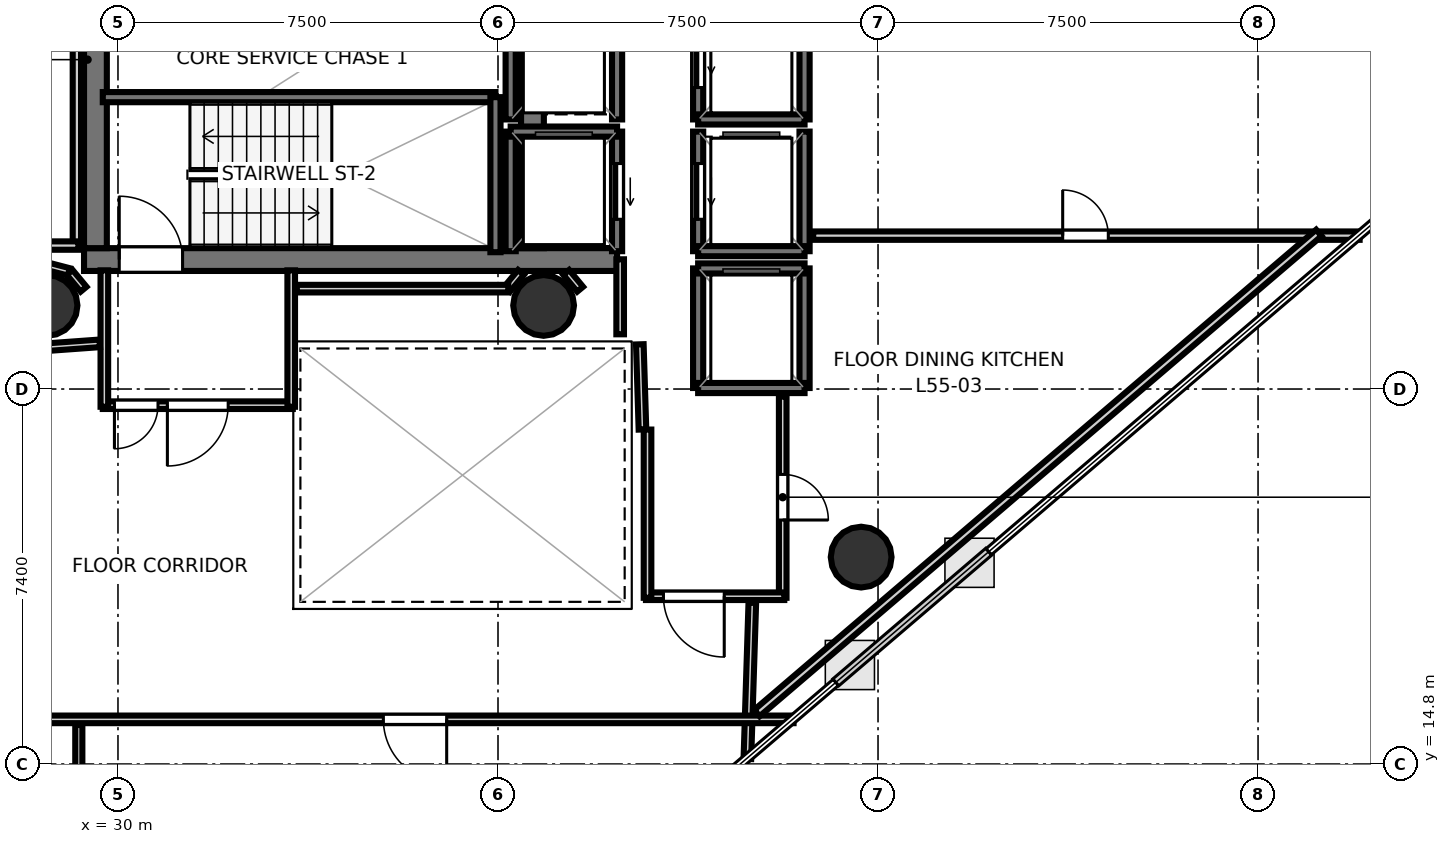
"""IFC4 building model, lengths in metres.
Left out: names, types, materials, properties, quantities, classifications, styles, units other than length and angle.
Written with IfcOpenShell. Run it as: python <this file> out.ifc"""

import sys

from ifc_helpers import new_model, si_unit, direction, frame, frame_2d, origin, origin_2d, place, context, subcontext, project, spatial, rectangle, hollow_circle, extrude, element, fill, save


model = new_model("IFC4")
c1 = context("Model", 3, precision=1e-05, world=origin(), true_north=direction((0.0, 1.0)))
c2 = subcontext(c1, "Body", "Model", "MODEL_VIEW")
j1 = project(units=[si_unit("LENGTHUNIT", "METRE"), si_unit("PLANEANGLEUNIT", "RADIAN")], contexts=[c1])
p1 = place(None, origin())
s1 = spatial("IfcSite", under=j1, at=p1, CompositionType="ELEMENT")
p2 = place(p1, origin())
s2 = spatial("IfcBuilding", under=s1, at=p2, CompositionType="ELEMENT")
p3 = place(p2, frame((0.0, 0.0, 215.1)))
s3 = spatial("IfcBuildingStorey", under=s2, at=p3, CompositionType="ELEMENT", Elevation=215.1)
p4 = place(p3, frame((29.33, 24.755, 0.0), z_axis=(0.0, 0.0, 1.0), x_axis=(1.0, 0.0, 0.0)))
e1 = element("IfcWall", 1, at=p4, inside=s3, PredefinedType="SHEAR", context=c2, shape_type="SweptSolid", body=[
    extrude(rectangle(XDim=10.52, YDim=0.45, at=frame_2d((5.26, 0.0))), origin(), (0.0, 0.0, 1.0), 3.52),
])
p5 = place(p4, frame((0.695, 0.0, 0.0)))
e2 = element("IfcOpeningElement", 2, at=p5, cuts=e1, PredefinedType="OPENING", context=c2, shape_type="SweptSolid", body=[
    extrude(rectangle(XDim=1.25, YDim=2.15, at=frame_2d((0.625, 1.075))), frame((0.0, 0.235, 0.0), z_axis=(0.0, -1.0, 0.0), x_axis=(1.0, 0.0, 0.0)), (0.0, 0.0, 1.0), 0.47),
])
for number, where, z_axis, x_axis in (
    (3, (29.555, 24.98, 0.0), (0.0, 0.0, 1.0), (0.0, 1.0, 0.0)),
    (4, (38.18, 24.98, 0.0), (0.0, 0.0, 1.0), (0.0, 1.0, 0.0)),
):
    element("IfcWall", number, at=place(p3, frame(where, z_axis=z_axis, x_axis=x_axis)), inside=s3, PredefinedType="SHEAR", context=c2, shape_type="SweptSolid", body=[
        extrude(rectangle(XDim=7.44, YDim=0.45, at=frame_2d((3.72, 0.0))), origin(), (0.0, 0.0, 1.0), 3.52),
    ])
for number, where, z_axis, x_axis in (
    (5, (28.6, 23.85, 0.0), (0.0, 0.0, 1.0), (1.0, 0.0, 0.0)),
    (6, (38.4, 23.85, 0.0), (0.0, 0.0, 1.0), (1.0, 0.0, 0.0)),
    (7, (44.667, 18.883, 0.0), (0.0, 0.0, 1.0), (1.0, 0.0, 0.0)),
):
    element("IfcColumn", number, at=place(p3, frame(where, z_axis=z_axis, x_axis=x_axis)), inside=s3, PredefinedType="COLUMN", context=c2, shape_type="SweptSolid", body=[
        extrude(hollow_circle(Radius=0.6, WallThickness=0.03, at=origin_2d()), origin(), (0.0, 0.0, 1.0), 3.7),
    ])
p6 = place(p3, frame((29.7, 27.96, 0.0), z_axis=(0.0, 0.0, 1.0), x_axis=(1.0, 0.0, 0.0)))
e8 = element("IfcWall", 8, at=p6, inside=s3, PredefinedType="SOLIDWALL", context=c2, shape_type="SweptSolid", body=[
    extrude(rectangle(XDim=7.75, YDim=0.2, at=frame_2d((3.875, 0.0))), origin(), (0.0, 0.0, 1.0), 3.52),
])
p7 = place(p3, frame((37.45, 24.9, 0.0), z_axis=(0.0, 0.0, 1.0), x_axis=(0.0, 1.0, 0.0)))
e9 = element("IfcWall", 9, at=p7, inside=s3, PredefinedType="SOLIDWALL", context=c2, shape_type="SweptSolid", body=[
    extrude(rectangle(XDim=3.06, YDim=0.2, at=frame_2d((1.53, 0.0))), origin(), (0.0, 0.0, 1.0), 3.52),
])
p8 = place(p3, frame((39.85, 24.92, 0.0), z_axis=(0.0, 0.0, 1.0), x_axis=(0.0, 1.0, 0.0)))
e10 = element("IfcWall", 10, at=p8, inside=s3, PredefinedType="SOLIDWALL", context=c2, shape_type="SweptSolid", body=[
    extrude(rectangle(XDim=2.36, YDim=0.2, at=frame_2d((1.18, 0.0))), origin(), (0.0, 0.0, 1.0), 3.52),
])
p9 = place(p8, frame((0.63, 0.0, 0.0)))
e11 = element("IfcOpeningElement", 11, at=p9, cuts=e10, PredefinedType="OPENING", context=c2, shape_type="SweptSolid", body=[
    extrude(rectangle(XDim=1.1, YDim=2.15, at=frame_2d((0.55, 1.075))), frame((0.0, 0.11, 0.0), z_axis=(0.0, -1.0, 0.0), x_axis=(1.0, 0.0, 0.0)), (0.0, 0.0, 1.0), 0.22),
])
p10 = place(p3, frame((37.75, 24.92, 0.0), z_axis=(0.0, 0.0, 1.0), x_axis=(0.0, 1.0, 0.0)))
e12 = element("IfcWall", 12, at=p10, inside=s3, PredefinedType="SOLIDWALL", context=c2, shape_type="SweptSolid", body=[
    extrude(rectangle(XDim=2.36, YDim=0.2, at=frame_2d((1.18, 0.0))), origin(), (0.0, 0.0, 1.0), 3.52),
])
p11 = place(p3, frame((37.75, 27.28, 0.0), z_axis=(0.0, 0.0, 1.0), x_axis=(1.0, 0.0, 0.0)))
e13 = element("IfcWall", 13, at=p11, inside=s3, PredefinedType="SOLIDWALL", context=c2, shape_type="SweptSolid", body=[
    extrude(rectangle(XDim=2.1, YDim=0.2, at=frame_2d((1.05, 0.0))), origin(), (0.0, 0.0, 1.0), 3.52),
])
p12 = place(p3, frame((43.55, 27.52, 0.0), z_axis=(0.0, 0.0, 1.0), x_axis=(0.0, 1.0, 0.0)))
e14 = element("IfcWall", 14, at=p12, inside=s3, PredefinedType="SOLIDWALL", context=c2, shape_type="SweptSolid", body=[
    extrude(rectangle(XDim=2.36, YDim=0.2, at=frame_2d((1.18, 0.0))), origin(), (0.0, 0.0, 1.0), 3.52),
])
p13 = place(p3, frame((41.45, 27.52, 0.0), z_axis=(0.0, 0.0, 1.0), x_axis=(0.0, 1.0, 0.0)))
e15 = element("IfcWall", 15, at=p13, inside=s3, PredefinedType="SOLIDWALL", context=c2, shape_type="SweptSolid", body=[
    extrude(rectangle(XDim=2.36, YDim=0.2, at=frame_2d((1.18, 0.0))), origin(), (0.0, 0.0, 1.0), 3.52),
])
p14 = place(p13, frame((0.63, 0.0, 0.0)))
e16 = element("IfcOpeningElement", 16, at=p14, cuts=e15, PredefinedType="OPENING", context=c2, shape_type="SweptSolid", body=[
    extrude(rectangle(XDim=1.1, YDim=2.15, at=frame_2d((0.55, 1.075))), frame((0.0, 0.11, 0.0), z_axis=(0.0, -1.0, 0.0), x_axis=(1.0, 0.0, 0.0)), (0.0, 0.0, 1.0), 0.22),
])
p15 = place(p3, frame((41.45, 27.52, 0.0), z_axis=(0.0, 0.0, 1.0), x_axis=(1.0, 0.0, 0.0)))
e17 = element("IfcWall", 17, at=p15, inside=s3, PredefinedType="SOLIDWALL", context=c2, shape_type="SweptSolid", body=[
    extrude(rectangle(XDim=2.1, YDim=0.2, at=frame_2d((1.05, 0.0))), origin(), (0.0, 0.0, 1.0), 3.52),
])
p16 = place(p3, frame((43.55, 24.92, 0.0), z_axis=(0.0, 0.0, 1.0), x_axis=(0.0, 1.0, 0.0)))
e18 = element("IfcWall", 18, at=p16, inside=s3, PredefinedType="SOLIDWALL", context=c2, shape_type="SweptSolid", body=[
    extrude(rectangle(XDim=2.36, YDim=0.2, at=frame_2d((1.18, 0.0))), origin(), (0.0, 0.0, 1.0), 3.52),
])
p17 = place(p3, frame((41.45, 24.92, 0.0), z_axis=(0.0, 0.0, 1.0), x_axis=(0.0, 1.0, 0.0)))
e19 = element("IfcWall", 19, at=p17, inside=s3, PredefinedType="SOLIDWALL", context=c2, shape_type="SweptSolid", body=[
    extrude(rectangle(XDim=2.36, YDim=0.2, at=frame_2d((1.18, 0.0))), origin(), (0.0, 0.0, 1.0), 3.52),
])
p18 = place(p17, frame((0.63, 0.0, 0.0)))
e20 = element("IfcOpeningElement", 20, at=p18, cuts=e19, PredefinedType="OPENING", context=c2, shape_type="SweptSolid", body=[
    extrude(rectangle(XDim=1.1, YDim=2.15, at=frame_2d((0.55, 1.075))), frame((0.0, 0.11, 0.0), z_axis=(0.0, -1.0, 0.0), x_axis=(1.0, 0.0, 0.0)), (0.0, 0.0, 1.0), 0.22),
])
p19 = place(p3, frame((41.45, 24.92, 0.0), z_axis=(0.0, 0.0, 1.0), x_axis=(1.0, 0.0, 0.0)))
e21 = element("IfcWall", 21, at=p19, inside=s3, PredefinedType="SOLIDWALL", context=c2, shape_type="SweptSolid", body=[
    extrude(rectangle(XDim=2.1, YDim=0.2, at=frame_2d((1.05, 0.0))), origin(), (0.0, 0.0, 1.0), 3.52),
])
for number, where, z_axis, x_axis in (
    (22, (39.85, 27.52, 0.0), (0.0, 0.0, 1.0), (0.0, 1.0, 0.0)),
    (23, (37.75, 27.52, 0.0), (0.0, 0.0, 1.0), (0.0, 1.0, 0.0)),
):
    element("IfcWall", number, at=place(p3, frame(where, z_axis=z_axis, x_axis=x_axis)), inside=s3, PredefinedType="SOLIDWALL", context=c2, shape_type="SweptSolid", body=[
        extrude(rectangle(XDim=2.36, YDim=0.2, at=frame_2d((1.18, 0.0))), origin(), (0.0, 0.0, 1.0), 3.52),
    ])
for number, where, z_axis, x_axis in (
    (24, (43.55, 22.22, 0.0), (0.0, 0.0, 1.0), (0.0, 1.0, 0.0)),
    (25, (41.45, 22.22, 0.0), (0.0, 0.0, 1.0), (0.0, 1.0, 0.0)),
):
    element("IfcWall", number, at=place(p3, frame(where, z_axis=z_axis, x_axis=x_axis)), inside=s3, PredefinedType="SOLIDWALL", context=c2, shape_type="SweptSolid", body=[
        extrude(rectangle(XDim=2.36, YDim=0.2, at=frame_2d((1.18, 0.0))), origin(), (0.0, 0.0, 1.0), 3.52),
    ])
for number, where, z_axis, x_axis in (
    (26, (41.45, 24.58, 0.0), (0.0, 0.0, 1.0), (1.0, 0.0, 0.0)),
    (27, (41.45, 22.22, 0.0), (0.0, 0.0, 1.0), (1.0, 0.0, 0.0)),
):
    element("IfcWall", number, at=place(p3, frame(where, z_axis=z_axis, x_axis=x_axis)), inside=s3, PredefinedType="SOLIDWALL", context=c2, shape_type="SweptSolid", body=[
        extrude(rectangle(XDim=2.1, YDim=0.2, at=frame_2d((1.05, 0.0))), origin(), (0.0, 0.0, 1.0), 3.52),
    ])
p20 = place(p3, frame((33.45, 21.881, 0.0), z_axis=(0.0, 0.0, 1.0), x_axis=(-1.0, 0.0, 0.0)))
e28 = element("IfcWall", 28, at=p20, inside=s3, PredefinedType="PARTITIONING", context=c2, shape_type="SweptSolid", body=[
    extrude(rectangle(XDim=3.75, YDim=0.15, at=frame_2d((1.875, 0.0))), origin(), (0.0, 0.0, 1.0), 2.84),
])
p21 = place(p20, frame((1.275, 0.0, 0.0)))
e29 = element("IfcOpeningElement", 29, at=p21, cuts=e28, PredefinedType="OPENING", context=c2, shape_type="SweptSolid", body=[
    extrude(rectangle(XDim=1.2, YDim=2.15, at=frame_2d((0.6, 1.075))), frame((0.0, 0.085, 0.0), z_axis=(0.0, -1.0, 0.0), x_axis=(1.0, 0.0, 0.0)), (0.0, 0.0, 1.0), 0.17),
])
p22 = place(p20, frame((2.66, 0.0, 0.0)))
e30 = element("IfcOpeningElement", 30, at=p22, cuts=e28, PredefinedType="OPENING", context=c2, shape_type="SweptSolid", body=[
    extrude(rectangle(XDim=0.86, YDim=2.05, at=frame_2d((0.43, 1.025))), frame((0.0, 0.085, 0.0), z_axis=(0.0, -1.0, 0.0), x_axis=(1.0, 0.0, 0.0)), (0.0, 0.0, 1.0), 0.17),
])
for number, where, z_axis, x_axis in (
    (31, (29.731, 21.85, 0.0), (0.0, 0.0, 1.0), (0.0, 1.0, 0.0)),
    (32, (33.419, 24.542, 0.0), (0.0, 0.0, 1.0), (0.0, -1.0, 0.0)),
):
    element("IfcWall", number, at=place(p3, frame(where, z_axis=z_axis, x_axis=x_axis)), inside=s3, PredefinedType="PARTITIONING", context=c2, shape_type="SweptSolid", body=[
        extrude(rectangle(XDim=2.692, YDim=0.15, at=frame_2d((1.346, 0.0))), origin(), (0.0, 0.0, 1.0), 2.84),
    ])
p23 = place(p3, frame((40.351, 21.401, 0.0), z_axis=(0.0, 0.0, 1.0), x_axis=(-0.031058045979, 0.999517582527, 0.0)))
e33 = element("IfcWall", 33, at=p23, inside=s3, PredefinedType="PARTITIONING", context=c2, shape_type="SweptSolid", body=[
    extrude(rectangle(XDim=1.682, YDim=0.15, at=frame_2d((0.841, 0.0))), origin(), (0.0, 0.0, 1.0), 2.84),
])
p24 = place(p3, frame((39.911, 23.28, 0.0), z_axis=(0.0, 0.0, 1.0), x_axis=(0.0, 1.0, 0.0)))
e34 = element("IfcWall", 34, at=p24, inside=s3, PredefinedType="PARTITIONING", context=c2, shape_type="SweptSolid", body=[
    extrude(rectangle(XDim=1.48, YDim=0.15, at=frame_2d((0.74, 0.0))), origin(), (0.0, 0.0, 1.0), 2.84),
])
p25 = place(p3, frame((43.119, 22.05, 0.0), z_axis=(0.0, 0.0, 1.0), x_axis=(0.0, -1.0, 0.0)))
e35 = element("IfcWall", 35, at=p25, inside=s3, PredefinedType="PARTITIONING", context=c2, shape_type="SweptSolid", body=[
    extrude(rectangle(XDim=3.97, YDim=0.15, at=frame_2d((1.985, 0.0))), origin(), (0.0, 0.0, 1.0), 2.84),
])
p26 = place(p25, frame((1.535, 0.0, 0.0)))
e36 = element("IfcOpeningElement", 36, at=p26, cuts=e35, PredefinedType="OPENING", context=c2, shape_type="SweptSolid", body=[
    extrude(rectangle(XDim=0.9, YDim=2.1, at=frame_2d((0.45, 1.05))), frame((0.0, 0.085, 0.0), z_axis=(0.0, -1.0, 0.0), x_axis=(1.0, 0.0, 0.0)), (0.0, 0.0, 1.0), 0.17),
])
p27 = place(p3, frame((43.15, 18.111, 0.0), z_axis=(0.0, 0.0, 1.0), x_axis=(-1.0, 0.0, 0.0)))
e37 = element("IfcWall", 37, at=p27, inside=s3, PredefinedType="PARTITIONING", context=c2, shape_type="SweptSolid", body=[
    extrude(rectangle(XDim=2.73, YDim=0.15, at=frame_2d((1.365, 0.0))), origin(), (0.0, 0.0, 1.0), 2.84),
])
p28 = place(p27, frame((1.185, 0.0, 0.0)))
e38 = element("IfcOpeningElement", 38, at=p28, cuts=e37, PredefinedType="OPENING", context=c2, shape_type="SweptSolid", body=[
    extrude(rectangle(XDim=1.2, YDim=2.15, at=frame_2d((0.6, 1.075))), frame((0.0, 0.085, 0.0), z_axis=(0.0, -1.0, 0.0), x_axis=(1.0, 0.0, 0.0)), (0.0, 0.0, 1.0), 0.17),
])
p29 = place(p3, frame((40.451, 18.08, 0.0), z_axis=(0.0, 0.0, 1.0), x_axis=(0.0, 1.0, 0.0)))
e39 = element("IfcWall", 39, at=p29, inside=s3, PredefinedType="PARTITIONING", context=c2, shape_type="SweptSolid", body=[
    extrude(rectangle(XDim=3.32, YDim=0.15, at=frame_2d((1.66, 0.0))), origin(), (0.0, 0.0, 1.0), 2.84),
])
p30 = place(p3, frame((29.189, 29.12, 0.0), z_axis=(0.0, 0.0, 1.0), x_axis=(0.0, -1.0, 0.0)))
e40 = element("IfcWall", 40, at=p30, inside=s3, PredefinedType="PLUMBINGWALL", context=c2, shape_type="SweptSolid", body=[
    extrude(rectangle(XDim=4.12, YDim=0.165, at=frame_2d((2.06, 0.0))), origin(), (0.0, 0.0, 1.0), 2.84),
])
p31 = place(p3, frame((29.22, 25.031, 0.0), z_axis=(0.0, 0.0, 1.0), x_axis=(-1.0, 0.0, 0.0)))
e41 = element("IfcWall", 41, at=p31, inside=s3, PredefinedType="PLUMBINGWALL", context=c2, shape_type="SweptSolid", body=[
    extrude(rectangle(XDim=1.5, YDim=0.165, at=frame_2d((0.75, 0.0))), origin(), (0.0, 0.0, 1.0), 2.84),
])
p32 = place(p3, frame((29.321, 24.17, 0.0), z_axis=(0.0, 0.0, 1.0), x_axis=(-0.638008265708, 0.770029514296, 0.0)))
e42 = element("IfcWall", 42, at=p32, inside=s3, PredefinedType="PARTITIONING", context=c2, shape_type="SweptSolid", body=[
    extrude(rectangle(XDim=0.431, YDim=0.15, at=frame_2d((0.215, 0.0))), origin(), (0.0, 0.0, 1.0), 2.84),
])
p33 = place(p3, frame((29.03, 24.512, 0.0), z_axis=(0.0, 0.0, 1.0), x_axis=(-0.967681003213, 0.252177469296, 0.0)))
e43 = element("IfcWall", 43, at=p33, inside=s3, PredefinedType="PARTITIONING", context=c2, shape_type="SweptSolid", body=[
    extrude(rectangle(XDim=0.488, YDim=0.15, at=frame_2d((0.244, 0.0))), origin(), (0.0, 0.0, 1.0), 2.84),
])
for number, where, z_axis, x_axis in (
    (44, (39.121, 24.17, 0.0), (0.0, 0.0, 1.0), (-0.638, 0.77, 0.0)),
    (45, (37.954, 24.502, 0.0), (0.0, 0.0, 1.0), (-0.638, -0.77, 0.0)),
):
    element("IfcWall", number, at=place(p3, frame(where, z_axis=z_axis, x_axis=x_axis)), inside=s3, PredefinedType="PARTITIONING", context=c2, shape_type="SweptSolid", body=[
        extrude(rectangle(XDim=0.431, YDim=0.15, at=frame_2d((0.215, 0.0))), origin(), (0.0, 0.0, 1.0), 2.84),
    ])
p34 = place(p3, frame((37.703, 24.181, 0.0), z_axis=(0.0, 0.0, 1.0), x_axis=(-1.0, 0.0, 0.0)))
e46 = element("IfcWall", 46, at=p34, inside=s3, PredefinedType="PARTITIONING", context=c2, shape_type="SweptSolid", body=[
    extrude(rectangle(XDim=4.173, YDim=0.15, at=frame_2d((2.086, 0.0))), origin(), (0.0, 0.0, 1.0), 2.84),
])
p35 = place(p3, frame((28.442, 23.015, 0.0), z_axis=(0.0, 0.0, 1.0), x_axis=(0.99740683837, 0.07196942943, 0.0)))
e47 = element("IfcWall", 47, at=p35, inside=s3, PredefinedType="PARTITIONING", context=c2, shape_type="SweptSolid", body=[
    extrude(rectangle(XDim=1.201, YDim=0.15, at=frame_2d((0.601, 0.0))), origin(), (0.0, 0.0, 1.0), 2.84),
])
p36 = place(p3, frame((42.519, 17.981, 0.0), z_axis=(0.0, 0.0, 1.0), x_axis=(-0.031677304437, -0.999498148264, 0.0)))
e48 = element("IfcWall", 48, at=p36, inside=s3, PredefinedType="PARTITIONING", context=c2, shape_type="SweptSolid", body=[
    extrude(rectangle(XDim=3.083, YDim=0.15, at=frame_2d((1.542, 0.0))), origin(), (0.0, 0.0, 1.0), 2.84),
])
p37 = place(p3, frame((43.333, 15.681, 0.0), z_axis=(0.0, 0.0, 1.0), x_axis=(-1.0, 0.0, 0.0)))
e49 = element("IfcWall", 49, at=p37, inside=s3, PredefinedType="PARTITIONING", context=c2, shape_type="SweptSolid", body=[
    extrude(rectangle(XDim=14.933, YDim=0.15, at=frame_2d((7.467, 0.0))), origin(), (0.0, 0.0, 1.0), 2.84),
])
p38 = place(p37, frame((6.846, 0.0, 0.0)))
e50 = element("IfcOpeningElement", 50, at=p38, cuts=e49, PredefinedType="OPENING", context=c2, shape_type="SweptSolid", body=[
    extrude(rectangle(XDim=1.25, YDim=2.2, at=frame_2d((0.625, 1.1))), frame((0.0, 0.085, 0.0), z_axis=(0.0, -1.0, 0.0), x_axis=(1.0, 0.0, 0.0)), (0.0, 0.0, 1.0), 0.17),
])
p39 = place(p3, frame((29.227, 15.57, 0.0), z_axis=(0.0, 0.0, 1.0), x_axis=(0.0, -1.0, 0.0)))
e51 = element("IfcWall", 51, at=p39, inside=s3, PredefinedType="PARTITIONING", context=c2, shape_type="SweptSolid", body=[
    extrude(rectangle(XDim=7.087, YDim=0.14, at=frame_2d((3.543, 0.0))), origin(), (0.0, 0.0, 1.0), 2.84),
])
p40 = place(p3, frame((43.72, 25.227, 0.0), z_axis=(0.0, 0.0, 1.0), x_axis=(1.0, 0.0, 0.0)))
e52 = element("IfcWall", 52, at=p40, inside=s3, PredefinedType="PLUMBINGWALL", context=c2, shape_type="SweptSolid", body=[
    extrude(rectangle(XDim=10.785, YDim=0.165, at=frame_2d((5.392, 0.0))), origin(), (0.0, 0.0, 1.0), 2.84),
])
p41 = place(p40, frame((4.925, 0.0, 0.0)))
e53 = element("IfcOpeningElement", 53, at=p41, cuts=e52, PredefinedType="OPENING", context=c2, shape_type="SweptSolid", body=[
    extrude(rectangle(XDim=0.9, YDim=2.1, at=frame_2d((0.45, 1.05))), frame((0.0, 0.093, 0.0), z_axis=(0.0, -1.0, 0.0), x_axis=(1.0, 0.0, 0.0)), (0.0, 0.0, 1.0), 0.185),
])
p42 = place(p3, frame((53.7, 25.281, 0.0), z_axis=(0.0, 0.0, 1.0), x_axis=(-0.760261052986, -0.64961768088, 0.0)))
e54 = element("IfcWall", 54, at=p42, inside=s3, PredefinedType="PLUMBINGWALL", context=c2, shape_type="SweptSolid", body=[
    extrude(rectangle(XDim=14.588, YDim=0.165, at=frame_2d((7.294, 0.0))), origin(), (0.0, 0.0, 1.0), 2.84),
])
p43 = place(p5, origin())
e55 = element("IfcDoor", 55, at=p43, inside=s3, OperationType="SINGLE_SWING_LEFT", PredefinedType="DOOR", context=c2, shape_type="SweptSolid", body=[
    extrude(rectangle(XDim=1.25, YDim=2.15, at=frame_2d((0.625, 1.075))), frame((0.0, 0.025, 0.0), z_axis=(0.0, -1.0, 0.0), x_axis=(1.0, 0.0, 0.0)), (0.0, 0.0, 1.0), 0.05),
])
fill(e2, e55)
p44 = place(p9, origin())
e56 = element("IfcDoor", 56, at=p44, inside=s3, OperationType="SLIDING_TO_LEFT", PredefinedType="DOOR", context=c2, shape_type="SweptSolid", body=[
    extrude(rectangle(XDim=1.1, YDim=2.15, at=frame_2d((0.55, 1.075))), frame((0.0, 0.025, 0.0), z_axis=(0.0, -1.0, 0.0), x_axis=(1.0, 0.0, 0.0)), (0.0, 0.0, 1.0), 0.05),
])
fill(e11, e56)
p45 = place(p14, origin())
e57 = element("IfcDoor", 57, at=p45, inside=s3, OperationType="SLIDING_TO_LEFT", PredefinedType="DOOR", context=c2, shape_type="SweptSolid", body=[
    extrude(rectangle(XDim=1.1, YDim=2.15, at=frame_2d((0.55, 1.075))), frame((0.0, 0.025, 0.0), z_axis=(0.0, -1.0, 0.0), x_axis=(1.0, 0.0, 0.0)), (0.0, 0.0, 1.0), 0.05),
])
fill(e16, e57)
p46 = place(p18, origin())
e58 = element("IfcDoor", 58, at=p46, inside=s3, OperationType="SLIDING_TO_LEFT", PredefinedType="DOOR", context=c2, shape_type="SweptSolid", body=[
    extrude(rectangle(XDim=1.1, YDim=2.15, at=frame_2d((0.55, 1.075))), frame((0.0, 0.025, 0.0), z_axis=(0.0, -1.0, 0.0), x_axis=(1.0, 0.0, 0.0)), (0.0, 0.0, 1.0), 0.05),
])
fill(e20, e58)
p47 = place(p21, origin())
e59 = element("IfcDoor", 59, at=p47, inside=s3, OperationType="SINGLE_SWING_RIGHT", PredefinedType="DOOR", context=c2, shape_type="SweptSolid", body=[
    extrude(rectangle(XDim=1.2, YDim=2.15, at=frame_2d((0.6, 1.075))), frame((0.0, 0.025, 0.0), z_axis=(0.0, -1.0, 0.0), x_axis=(1.0, 0.0, 0.0)), (0.0, 0.0, 1.0), 0.05),
])
fill(e29, e59)
p48 = place(p28, origin())
e60 = element("IfcDoor", 60, at=p48, inside=s3, OperationType="SINGLE_SWING_LEFT", PredefinedType="DOOR", context=c2, shape_type="SweptSolid", body=[
    extrude(rectangle(XDim=1.2, YDim=2.15, at=frame_2d((0.6, 1.075))), frame((0.0, 0.025, 0.0), z_axis=(0.0, -1.0, 0.0), x_axis=(1.0, 0.0, 0.0)), (0.0, 0.0, 1.0), 0.05),
])
fill(e38, e60)
p49 = place(p22, origin())
e61 = element("IfcDoor", 61, at=p49, inside=s3, OperationType="SINGLE_SWING_RIGHT", PredefinedType="DOOR", context=c2, shape_type="SweptSolid", body=[
    extrude(rectangle(XDim=0.86, YDim=2.05, at=frame_2d((0.43, 1.025))), frame((0.0, 0.025, 0.0), z_axis=(0.0, -1.0, 0.0), x_axis=(1.0, 0.0, 0.0)), (0.0, 0.0, 1.0), 0.05),
])
fill(e30, e61)
p50 = place(p38, origin())
e62 = element("IfcDoor", 62, at=p50, inside=s3, OperationType="SINGLE_SWING_LEFT", PredefinedType="DOOR", context=c2, shape_type="SweptSolid", body=[
    extrude(rectangle(XDim=1.25, YDim=2.2, at=frame_2d((0.625, 1.1))), frame((0.0, 0.025, 0.0), z_axis=(0.0, -1.0, 0.0), x_axis=(1.0, 0.0, 0.0)), (0.0, 0.0, 1.0), 0.05),
])
fill(e50, e62)
p51 = place(p26, origin())
e63 = element("IfcDoor", 63, at=p51, inside=s3, OperationType="SINGLE_SWING_RIGHT", PredefinedType="DOOR", context=c2, shape_type="SweptSolid", body=[
    extrude(rectangle(XDim=0.9, YDim=2.1, at=frame_2d((0.45, 1.05))), frame((0.0, 0.025, 0.0), z_axis=(0.0, -1.0, 0.0), x_axis=(1.0, 0.0, 0.0)), (0.0, 0.0, 1.0), 0.05),
])
fill(e36, e63)
p52 = place(p41, origin())
e64 = element("IfcDoor", 64, at=p52, inside=s3, OperationType="SINGLE_SWING_LEFT", PredefinedType="DOOR", context=c2, shape_type="SweptSolid", body=[
    extrude(rectangle(XDim=0.9, YDim=2.1, at=frame_2d((0.45, 1.05))), frame((0.0, 0.025, 0.0), z_axis=(0.0, -1.0, 0.0), x_axis=(1.0, 0.0, 0.0)), (0.0, 0.0, 1.0), 0.05),
])
fill(e53, e64)
save(model, sys.argv[1])
